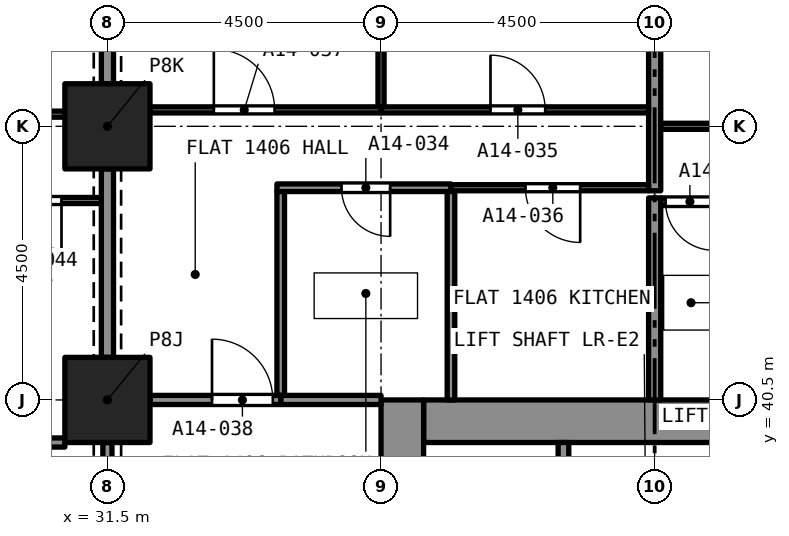
"""IFC4 building model, lengths in metres.
Left out: names, types, materials, properties, quantities, classifications, styles, units other than length and angle.
Written with IfcOpenShell. Run it as: python <this file> out.ifc"""

import sys

from ifc_helpers import new_model, si_unit, direction, frame, frame_2d, origin, origin_2d, place, context, subcontext, project, spatial, rectangle, extrude, element, fill, save


model = new_model("IFC4")
c1 = context("Model", 3, precision=1e-05, world=origin(), true_north=direction((0.0, 1.0)))
c2 = subcontext(c1, "Body", "Model", "MODEL_VIEW")
j1 = project(units=[si_unit("LENGTHUNIT", "METRE"), si_unit("PLANEANGLEUNIT", "RADIAN")], contexts=[c1])
p1 = place(None, origin())
s1 = spatial("IfcSite", under=j1, at=p1, CompositionType="ELEMENT")
p2 = place(p1, origin())
s2 = spatial("IfcBuilding", under=s1, at=p2, CompositionType="ELEMENT")
p3 = place(p2, frame((0.0, 0.0, 56.0)))
s3 = spatial("IfcBuildingStorey", under=s2, at=p3, CompositionType="ELEMENT", Elevation=56.0)
for number, where, z_axis, x_axis in (
    (1, (31.5, 40.5, 0.0), (0.0, 0.0, 1.0), (1.0, 0.0, 0.0)),
    (2, (31.5, 45.0, 0.0), (0.0, 0.0, 1.0), (1.0, 0.0, 0.0)),
):
    element("IfcColumn", number, at=place(p3, frame(where, z_axis=z_axis, x_axis=x_axis)), inside=s3, PredefinedType="COLUMN", context=c2, shape_type="SweptSolid", body=[
        extrude(rectangle(XDim=1.4, YDim=1.4, at=origin_2d()), origin(), (0.0, 0.0, 1.0), 3.2),
    ])
p4 = place(p3, frame((36.7, 40.15, 0.0), z_axis=(0.0, 0.0, 1.0), x_axis=(1.0, 0.0, 0.0)))
e3 = element("IfcWall", 3, at=p4, inside=s3, PredefinedType="SOLIDWALL", context=c2, shape_type="SweptSolid", body=[
    extrude(rectangle(XDim=7.6, YDim=0.7, at=frame_2d((3.8, 0.0))), origin(), (0.0, 0.0, 1.0), 3.2),
])
p5 = place(p3, frame((36.35, 27.0, 0.0), z_axis=(0.0, 0.0, 1.0), x_axis=(0.0, 1.0, 0.0)))
e4 = element("IfcWall", 4, at=p5, inside=s3, PredefinedType="SOLIDWALL", context=c2, shape_type="SweptSolid", body=[
    extrude(rectangle(XDim=13.5, YDim=0.7, at=frame_2d((6.75, 0.0))), origin(), (0.0, 0.0, 1.0), 3.2),
])
p6 = place(p5, frame((8.95, 0.0, 0.0)))
e5 = element("IfcOpeningElement", 5, at=p6, cuts=e4, PredefinedType="OPENING", context=c2, shape_type="SweptSolid", body=[
    extrude(rectangle(XDim=1.2, YDim=2.1, at=frame_2d((0.6, 1.05))), frame((0.0, 0.36, 0.0), z_axis=(0.0, -1.0, 0.0), x_axis=(1.0, 0.0, 0.0)), (0.0, 0.0, 1.0), 0.72),
])
p7 = place(p3, frame((41.659, 43.76, 0.0), z_axis=(0.0, 0.0, 1.0), x_axis=(-1.0, 0.0, 0.0)))
e6 = element("IfcWall", 6, at=p7, inside=s3, PredefinedType="PARTITIONING", context=c2, shape_type="SweptSolid", body=[
    extrude(rectangle(XDim=1.059, YDim=0.125, at=frame_2d((0.53, 0.0))), origin(), (0.0, 0.0, 1.0), 2.9),
])
p8 = place(p7, frame((0.179, 0.0, 0.0)))
e7 = element("IfcOpeningElement", 7, at=p8, cuts=e6, PredefinedType="OPENING", context=c2, shape_type="SweptSolid", body=[
    extrude(rectangle(XDim=0.8, YDim=2.1, at=frame_2d((0.4, 1.05))), frame((0.0, 0.073, 0.0), z_axis=(0.0, -1.0, 0.0), x_axis=(1.0, 0.0, 0.0)), (0.0, 0.0, 1.0), 0.145),
])
p9 = place(p3, frame((40.5, 40.5, 0.0), z_axis=(0.0, 0.0, 1.0), x_axis=(0.0, 1.0, 0.0)))
e8 = element("IfcWall", 8, at=p9, inside=s3, PredefinedType="PARTITIONING", context=c2, shape_type="SweptSolid", body=[
    extrude(rectangle(XDim=3.323, YDim=0.2, at=frame_2d((1.661, 0.0))), origin(), (0.0, 0.0, 1.0), 2.9),
])
p10 = place(p3, frame((40.6, 45.0, 0.0), z_axis=(0.0, 0.0, 1.0), x_axis=(1.0, 0.0, 0.0)))
e9 = element("IfcWall", 9, at=p10, inside=s3, PredefinedType="PARTITIONING", context=c2, shape_type="SweptSolid", body=[
    extrude(rectangle(XDim=4.4, YDim=0.1, at=frame_2d((2.2, 0.0))), origin(), (0.0, 0.0, 1.0), 2.9),
])
p11 = place(p10, frame((1.7, 0.0, 0.0)))
e10 = element("IfcOpeningElement", 10, at=p11, cuts=e9, PredefinedType="OPENING", context=c2, shape_type="SweptSolid", body=[
    extrude(rectangle(XDim=0.9, YDim=2.1, at=frame_2d((0.45, 1.05))), frame((0.0, 0.06, 0.0), z_axis=(0.0, -1.0, 0.0), x_axis=(1.0, 0.0, 0.0)), (0.0, 0.0, 1.0), 0.12),
])
p12 = place(p3, frame((40.5, 43.94, 0.0), z_axis=(0.0, 0.0, 1.0), x_axis=(0.0, 1.0, 0.0)))
e11 = element("IfcWall", 11, at=p12, inside=s3, PredefinedType="PARTITIONING", context=c2, shape_type="SweptSolid", body=[
    extrude(rectangle(XDim=4.86, YDim=0.2, at=frame_2d((2.43, 0.0))), origin(), (0.0, 0.0, 1.0), 2.9),
])
p13 = place(p3, frame((34.35, 40.575, 0.0), z_axis=(0.0, 0.0, 1.0), x_axis=(0.0, 1.0, 0.0)))
e12 = element("IfcWall", 12, at=p13, inside=s3, PredefinedType="PARTITIONING", context=c2, shape_type="SweptSolid", body=[
    extrude(rectangle(XDim=3.353, YDim=0.125, at=frame_2d((1.676, 0.0))), origin(), (0.0, 0.0, 1.0), 2.9),
])
p14 = place(p3, frame((37.15, 43.99, 0.0), z_axis=(0.0, 0.0, 1.0), x_axis=(-1.0, 0.0, 0.0)))
e13 = element("IfcWall", 13, at=p14, inside=s3, PredefinedType="PARTITIONING", context=c2, shape_type="SweptSolid", body=[
    extrude(rectangle(XDim=2.862, YDim=0.125, at=frame_2d((1.431, 0.0))), origin(), (0.0, 0.0, 1.0), 2.9),
])
p15 = place(p14, frame((1.0, 0.0, 0.0)))
e14 = element("IfcOpeningElement", 14, at=p15, cuts=e13, PredefinedType="OPENING", context=c2, shape_type="SweptSolid", body=[
    extrude(rectangle(XDim=0.8, YDim=2.1, at=frame_2d((0.4, 1.05))), frame((0.0, 0.073, 0.0), z_axis=(0.0, -1.0, 0.0), x_axis=(1.0, 0.0, 0.0)), (0.0, 0.0, 1.0), 0.145),
])
p16 = place(p3, frame((37.15, 40.5, 0.0), z_axis=(0.0, 0.0, 1.0), x_axis=(0.0, 1.0, 0.0)))
e15 = element("IfcWall", 15, at=p16, inside=s3, PredefinedType="PARTITIONING", context=c2, shape_type="SweptSolid", body=[
    extrude(rectangle(XDim=3.427, YDim=0.125, at=frame_2d((1.714, 0.0))), origin(), (0.0, 0.0, 1.0), 2.9),
])
p17 = place(p3, frame((34.35, 40.5, 0.0), z_axis=(0.0, 0.0, 1.0), x_axis=(1.0, 0.0, 0.0)))
e16 = element("IfcWall", 16, at=p17, inside=s3, PredefinedType="PARTITIONING", context=c2, shape_type="SweptSolid", body=[
    extrude(rectangle(XDim=1.65, YDim=0.15, at=frame_2d((0.825, 0.0))), origin(), (0.0, 0.0, 1.0), 2.9),
])
p18 = place(p3, frame((36.0, 45.27, 0.0), z_axis=(0.0, 0.0, 1.0), x_axis=(1.0, 0.0, 0.0)))
e17 = element("IfcWall", 17, at=p18, inside=s3, PredefinedType="PARTITIONING", context=c2, shape_type="SweptSolid", body=[
    extrude(rectangle(XDim=4.4, YDim=0.1, at=frame_2d((2.2, 0.0))), origin(), (0.0, 0.0, 1.0), 2.9),
])
p19 = place(p18, frame((1.8, 0.0, 0.0)))
e18 = element("IfcOpeningElement", 18, at=p19, cuts=e17, PredefinedType="OPENING", context=c2, shape_type="SweptSolid", body=[
    extrude(rectangle(XDim=0.9, YDim=2.1, at=frame_2d((0.45, 1.05))), frame((0.0, 0.06, 0.0), z_axis=(0.0, -1.0, 0.0), x_axis=(1.0, 0.0, 0.0)), (0.0, 0.0, 1.0), 0.12),
])
p20 = place(p3, frame((36.0, 45.32, 0.0), z_axis=(0.0, 0.0, 1.0), x_axis=(0.0, 1.0, 0.0)))
e19 = element("IfcWall", 19, at=p20, inside=s3, PredefinedType="PARTITIONING", context=c2, shape_type="SweptSolid", body=[
    extrude(rectangle(XDim=3.48, YDim=0.1, at=frame_2d((1.74, 0.0))), origin(), (0.0, 0.0, 1.0), 2.9),
])
p21 = place(p3, frame((40.4, 43.99, 0.0), z_axis=(0.0, 0.0, 1.0), x_axis=(-1.0, 0.0, 0.0)))
e20 = element("IfcWall", 20, at=p21, inside=s3, PredefinedType="PARTITIONING", context=c2, shape_type="SweptSolid", body=[
    extrude(rectangle(XDim=3.25, YDim=0.1, at=frame_2d((1.625, 0.0))), origin(), (0.0, 0.0, 1.0), 2.9),
])
p22 = place(p21, frame((1.125, 0.0, 0.0)))
e21 = element("IfcOpeningElement", 21, at=p22, cuts=e20, PredefinedType="OPENING", context=c2, shape_type="SweptSolid", body=[
    extrude(rectangle(XDim=0.9, YDim=2.1, at=frame_2d((0.45, 1.05))), frame((0.0, 0.06, 0.0), z_axis=(0.0, -1.0, 0.0), x_axis=(1.0, 0.0, 0.0)), (0.0, 0.0, 1.0), 0.12),
])
p23 = place(p3, frame((32.2, 45.27, 0.0), z_axis=(0.0, 0.0, 1.0), x_axis=(1.0, 0.0, 0.0)))
e22 = element("IfcWall", 22, at=p23, inside=s3, PredefinedType="PARTITIONING", context=c2, shape_type="SweptSolid", body=[
    extrude(rectangle(XDim=3.8, YDim=0.1, at=frame_2d((1.9, 0.0))), origin(), (0.0, 0.0, 1.0), 2.9),
])
p24 = place(p23, frame((1.05, 0.0, 0.0)))
e23 = element("IfcOpeningElement", 23, at=p24, cuts=e22, PredefinedType="OPENING", context=c2, shape_type="SweptSolid", body=[
    extrude(rectangle(XDim=1.0, YDim=2.1, at=frame_2d((0.5, 1.05))), frame((0.0, 0.06, 0.0), z_axis=(0.0, -1.0, 0.0), x_axis=(1.0, 0.0, 0.0)), (0.0, 0.0, 1.0), 0.12),
])
p25 = place(p3, frame((31.5, 41.2, 0.0), z_axis=(0.0, 0.0, 1.0), x_axis=(0.0, 1.0, 0.0)))
e24 = element("IfcWall", 24, at=p25, inside=s3, PredefinedType="PARTITIONING", context=c2, shape_type="SweptSolid", body=[
    extrude(rectangle(XDim=3.1, YDim=0.2, at=frame_2d((1.55, 0.0))), origin(), (0.0, 0.0, 1.0), 2.38),
])
p26 = place(p3, frame((32.2, 40.5, 0.0), z_axis=(0.0, 0.0, 1.0), x_axis=(1.0, 0.0, 0.0)))
e25 = element("IfcWall", 25, at=p26, inside=s3, PredefinedType="PARTITIONING", context=c2, shape_type="SweptSolid", body=[
    extrude(rectangle(XDim=2.15, YDim=0.15, at=frame_2d((1.075, 0.0))), origin(), (0.0, 0.0, 1.0), 2.9),
])
p27 = place(p26, frame((1.02, 0.0, 0.0)))
e26 = element("IfcOpeningElement", 26, at=p27, cuts=e25, PredefinedType="OPENING", context=c2, shape_type="SweptSolid", body=[
    extrude(rectangle(XDim=1.0, YDim=2.1, at=frame_2d((0.5, 1.05))), frame((0.0, 0.085, 0.0), z_axis=(0.0, -1.0, 0.0), x_axis=(1.0, 0.0, 0.0)), (0.0, 0.0, 1.0), 0.17),
])
p28 = place(p3, frame((31.5, 45.7, 0.0), z_axis=(0.0, 0.0, 1.0), x_axis=(0.0, 1.0, 0.0)))
e27 = element("IfcWall", 27, at=p28, inside=s3, PredefinedType="PARTITIONING", context=c2, shape_type="SweptSolid", body=[
    extrude(rectangle(XDim=3.1, YDim=0.2, at=frame_2d((1.55, 0.0))), origin(), (0.0, 0.0, 1.0), 2.38),
])
p29 = place(p3, frame((27.0, 45.2, 0.0), z_axis=(0.0, 0.0, 1.0), x_axis=(1.0, 0.0, 0.0)))
e28 = element("IfcWall", 28, at=p29, inside=s3, PredefinedType="PARTITIONING", context=c2, shape_type="SweptSolid", body=[
    extrude(rectangle(XDim=3.8, YDim=0.1, at=frame_2d((1.9, 0.0))), origin(), (0.0, 0.0, 1.0), 2.75),
])
p30 = place(p29, frame((1.8, 0.0, 0.0)))
e29 = element("IfcOpeningElement", 29, at=p30, cuts=e28, PredefinedType="OPENING", context=c2, shape_type="SweptSolid", body=[
    extrude(rectangle(XDim=0.9, YDim=2.1, at=frame_2d((0.45, 1.05))), frame((0.0, 0.06, 0.0), z_axis=(0.0, -1.0, 0.0), x_axis=(1.0, 0.0, 0.0)), (0.0, 0.0, 1.0), 0.12),
])
p31 = place(p3, frame((31.4, 43.78, 0.0), z_axis=(0.0, 0.0, 1.0), x_axis=(-1.0, 0.0, 0.0)))
e30 = element("IfcWall", 30, at=p31, inside=s3, PredefinedType="PARTITIONING", context=c2, shape_type="SweptSolid", body=[
    extrude(rectangle(XDim=1.811, YDim=0.1, at=frame_2d((0.905, 0.0))), origin(), (0.0, 0.0, 1.0), 2.75),
])
p32 = place(p31, frame((0.655, 0.0, 0.0)))
e31 = element("IfcOpeningElement", 31, at=p32, cuts=e30, PredefinedType="OPENING", context=c2, shape_type="SweptSolid", body=[
    extrude(rectangle(XDim=0.8, YDim=2.1, at=frame_2d((0.4, 1.05))), frame((0.0, 0.06, 0.0), z_axis=(0.0, -1.0, 0.0), x_axis=(1.0, 0.0, 0.0)), (0.0, 0.0, 1.0), 0.12),
])
p33 = place(p3, frame((25.35, 39.8, 0.0), z_axis=(0.0, 0.0, 1.0), x_axis=(1.0, 0.0, 0.0)))
e32 = element("IfcWall", 32, at=p33, inside=s3, PredefinedType="PARTITIONING", context=c2, shape_type="SweptSolid", body=[
    extrude(rectangle(XDim=5.45, YDim=0.15, at=frame_2d((2.725, 0.0))), origin(), (0.0, 0.0, 1.0), 2.75),
])
p34 = place(p3, frame((31.5, 36.7, 0.0), z_axis=(0.0, 0.0, 1.0), x_axis=(0.0, 1.0, 0.0)))
e33 = element("IfcWall", 33, at=p34, inside=s3, PredefinedType="PARTITIONING", context=c2, shape_type="SweptSolid", body=[
    extrude(rectangle(XDim=3.1, YDim=0.15, at=frame_2d((1.55, 0.0))), origin(), (0.0, 0.0, 1.0), 2.38),
])
p35 = place(p34, frame((0.95, 0.0, 0.0)))
e34 = element("IfcOpeningElement", 34, at=p35, cuts=e33, PredefinedType="OPENING", context=c2, shape_type="SweptSolid", body=[
    extrude(rectangle(XDim=1.2, YDim=2.1, at=frame_2d((0.6, 1.05))), frame((0.0, 0.085, 0.0), z_axis=(0.0, -1.0, 0.0), x_axis=(1.0, 0.0, 0.0)), (0.0, 0.0, 1.0), 0.17),
])
p36 = place(p3, frame((39.0, 37.5, 0.0), z_axis=(0.0, 0.0, 1.0), x_axis=(0.0, 1.0, 0.0)))
e35 = element("IfcWall", 35, at=p36, inside=s3, PredefinedType="SOLIDWALL", context=c2, shape_type="SweptSolid", body=[
    extrude(rectangle(XDim=2.3, YDim=0.175, at=frame_2d((1.15, 0.0))), origin(), (0.0, 0.0, 1.0), 2.9),
])
p37 = place(p8, origin())
e36 = element("IfcDoor", 36, at=p37, inside=s3, OperationType="SINGLE_SWING_RIGHT", PredefinedType="DOOR", context=c2, shape_type="SweptSolid", body=[
    extrude(rectangle(XDim=0.8, YDim=2.1, at=frame_2d((0.4, 1.05))), frame((0.0, 0.025, 0.0), z_axis=(0.0, -1.0, 0.0), x_axis=(1.0, 0.0, 0.0)), (0.0, 0.0, 1.0), 0.05),
])
fill(e7, e36)
p38 = place(p15, origin())
e37 = element("IfcDoor", 37, at=p38, inside=s3, OperationType="SINGLE_SWING_LEFT", PredefinedType="DOOR", context=c2, shape_type="SweptSolid", body=[
    extrude(rectangle(XDim=0.8, YDim=2.1, at=frame_2d((0.4, 1.05))), frame((0.0, 0.025, 0.0), z_axis=(0.0, -1.0, 0.0), x_axis=(1.0, 0.0, 0.0)), (0.0, 0.0, 1.0), 0.05),
])
fill(e14, e37)
p39 = place(p19, origin())
e38 = element("IfcDoor", 38, at=p39, inside=s3, OperationType="SINGLE_SWING_RIGHT", PredefinedType="DOOR", context=c2, shape_type="SweptSolid", body=[
    extrude(rectangle(XDim=0.9, YDim=2.1, at=frame_2d((0.45, 1.05))), frame((0.0, 0.025, 0.0), z_axis=(0.0, -1.0, 0.0), x_axis=(1.0, 0.0, 0.0)), (0.0, 0.0, 1.0), 0.05),
])
fill(e18, e38)
p40 = place(p22, origin())
e39 = element("IfcDoor", 39, at=p40, inside=s3, OperationType="SINGLE_SWING_LEFT", PredefinedType="DOOR", context=c2, shape_type="SweptSolid", body=[
    extrude(rectangle(XDim=0.9, YDim=2.1, at=frame_2d((0.45, 1.05))), frame((0.0, 0.025, 0.0), z_axis=(0.0, -1.0, 0.0), x_axis=(1.0, 0.0, 0.0)), (0.0, 0.0, 1.0), 0.05),
])
fill(e21, e39)
p41 = place(p24, origin())
e40 = element("IfcDoor", 40, at=p41, inside=s3, OperationType="SINGLE_SWING_LEFT", PredefinedType="DOOR", context=c2, shape_type="SweptSolid", body=[
    extrude(rectangle(XDim=1.0, YDim=2.1, at=frame_2d((0.5, 1.05))), frame((0.0, 0.025, 0.0), z_axis=(0.0, -1.0, 0.0), x_axis=(1.0, 0.0, 0.0)), (0.0, 0.0, 1.0), 0.05),
])
fill(e23, e40)
p42 = place(p27, origin())
e41 = element("IfcDoor", 41, at=p42, inside=s3, OperationType="SINGLE_SWING_RIGHT", PredefinedType="DOOR", context=c2, shape_type="SweptSolid", body=[
    extrude(rectangle(XDim=1.0, YDim=2.1, at=frame_2d((0.5, 1.05))), frame((0.0, 0.025, 0.0), z_axis=(0.0, -1.0, 0.0), x_axis=(1.0, 0.0, 0.0)), (0.0, 0.0, 1.0), 0.05),
])
fill(e26, e41)
p43 = place(p32, origin())
e42 = element("IfcDoor", 42, at=p43, inside=s3, OperationType="SINGLE_SWING_RIGHT", PredefinedType="DOOR", context=c2, shape_type="SweptSolid", body=[
    extrude(rectangle(XDim=0.8, YDim=2.1, at=frame_2d((0.4, 1.05))), frame((0.0, 0.025, 0.0), z_axis=(0.0, -1.0, 0.0), x_axis=(1.0, 0.0, 0.0)), (0.0, 0.0, 1.0), 0.05),
])
fill(e31, e42)
save(model, sys.argv[1])
